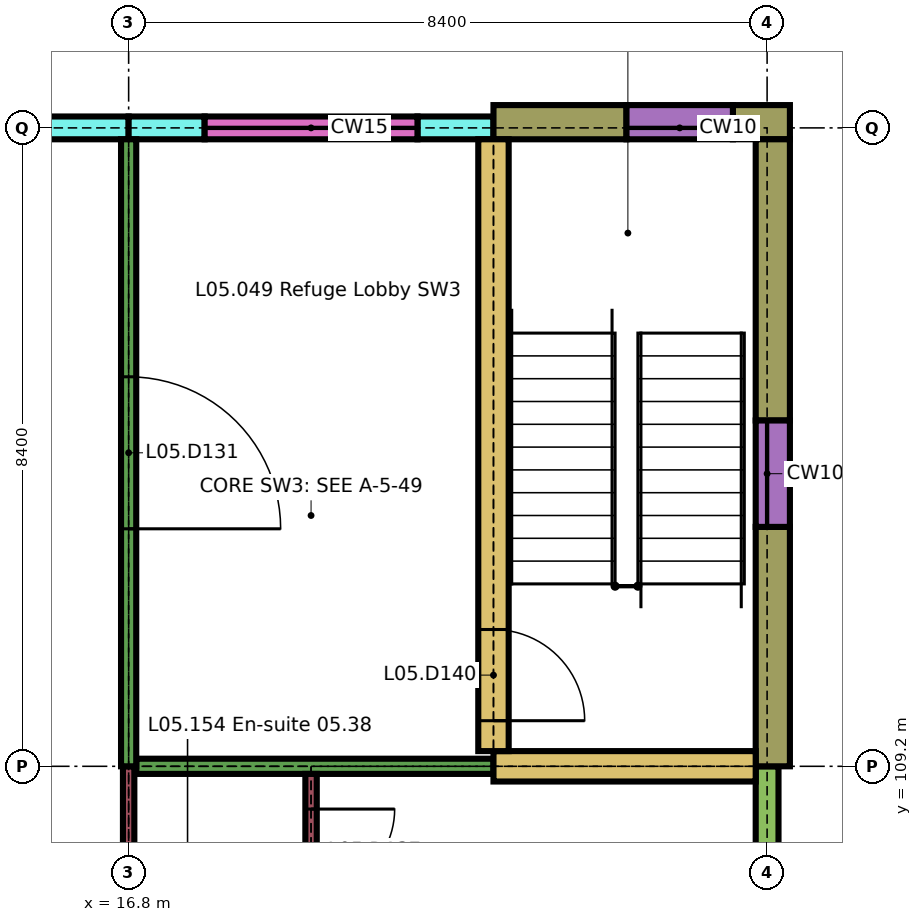
"""IFC4 building model, lengths in metres.
Left out: names, types, materials, properties, quantities, classifications, styles, units other than length and angle.
Written with IfcOpenShell. Run it as: python <this file> out.ifc"""

import sys

from ifc_helpers import new_model, si_unit, direction, frame, frame_2d, origin, place, context, subcontext, project, spatial, rectangle, extrude, element, fill, save


model = new_model("IFC4")
c1 = context("Model", 3, precision=1e-05, world=origin(), true_north=direction((0.0, 1.0)))
c2 = subcontext(c1, "Body", "Model", "MODEL_VIEW")
j1 = project(units=[si_unit("LENGTHUNIT", "METRE"), si_unit("PLANEANGLEUNIT", "RADIAN")], contexts=[c1])
p1 = place(None, origin())
s1 = spatial("IfcSite", under=j1, at=p1, CompositionType="ELEMENT")
p2 = place(p1, origin())
s2 = spatial("IfcBuilding", under=s1, at=p2, CompositionType="ELEMENT")
p3 = place(p2, frame((0.0, 0.0, 22.5)))
s3 = spatial("IfcBuildingStorey", under=s2, at=p3, CompositionType="ELEMENT", Elevation=22.5)
p4 = place(p3, frame((13.8, 117.6, 0.0), z_axis=(0.0, 0.0, 1.0), x_axis=(1.0, 0.0, 0.0)))
e1 = element("IfcWall", 1, at=p4, inside=s3, PredefinedType="SOLIDWALL", context=c2, shape_type="SweptSolid", body=[
    extrude(rectangle(XDim=3.0, YDim=0.3, at=frame_2d((1.5, 0.0))), origin(), (0.0, 0.0, 1.0), 3.26),
])
p5 = place(p4, frame((0.45, 0.0, 0.9)))
e2 = element("IfcOpeningElement", 2, at=p5, cuts=e1, PredefinedType="OPENING", context=c2, shape_type="SweptSolid", body=[
    extrude(rectangle(XDim=0.9, YDim=1.5, at=frame_2d((0.45, 0.75))), frame((0.0, 0.16, 0.0), z_axis=(0.0, -1.0, 0.0), x_axis=(1.0, 0.0, 0.0)), (0.0, 0.0, 1.0), 0.32),
])
for number, where, z_axis, x_axis in (
    (3, (16.8, 117.6, 0.0), (0.0, 0.0, 1.0), (1.0, 0.0, 0.0)),
    (4, (20.6, 117.6, 0.0), (0.0, 0.0, 1.0), (1.0, 0.0, 0.0)),
):
    element("IfcWall", number, at=place(p3, frame(where, z_axis=z_axis, x_axis=x_axis)), inside=s3, PredefinedType="SOLIDWALL", context=c2, shape_type="SweptSolid", body=[
        extrude(rectangle(XDim=1.0, YDim=0.3, at=frame_2d((0.5, 0.0))), origin(), (0.0, 0.0, 1.0), 3.26),
    ])
p6 = place(p3, frame((17.8, 117.6, 0.0), z_axis=(0.0, 0.0, 1.0), x_axis=(1.0, 0.0, 0.0)))
e5 = element("IfcWall", 5, at=p6, inside=s3, PredefinedType="SOLIDWALL", context=c2, shape_type="SweptSolid", body=[
    extrude(rectangle(XDim=2.8, YDim=0.3, at=frame_2d((1.4, 0.0))), origin(), (0.0, 0.0, 1.0), 0.6),
])
p7 = place(p3, frame((21.6, 117.675, 0.0), z_axis=(0.0, 0.0, 1.0), x_axis=(1.0, 0.0, 0.0)))
e6 = element("IfcWall", 6, at=p7, inside=s3, PredefinedType="SOLIDWALL", context=c2, shape_type="SweptSolid", body=[
    extrude(rectangle(XDim=1.75, YDim=0.45, at=frame_2d((0.875, 0.0))), origin(), (0.0, 0.0, 1.0), 3.26),
])
p8 = place(p3, frame((24.75, 117.675, 0.0), z_axis=(0.0, 0.0, 1.0), x_axis=(1.0, 0.0, 0.0)))
e7 = element("IfcWall", 7, at=p8, inside=s3, PredefinedType="SOLIDWALL", context=c2, shape_type="SweptSolid", body=[
    extrude(rectangle(XDim=0.75, YDim=0.45, at=frame_2d((0.375, 0.0))), origin(), (0.0, 0.0, 1.0), 3.26),
])
p9 = place(p3, frame((23.35, 117.675, 0.0), z_axis=(0.0, 0.0, 1.0), x_axis=(1.0, 0.0, 0.0)))
e8 = element("IfcWall", 8, at=p9, inside=s3, PredefinedType="SOLIDWALL", context=c2, shape_type="SweptSolid", body=[
    extrude(rectangle(XDim=1.4, YDim=0.45, at=frame_2d((0.7, 0.0))), origin(), (0.0, 0.0, 1.0), 0.6),
])
p10 = place(p3, frame((25.2, 105.0, 0.0), z_axis=(0.0, 0.0, 1.0), x_axis=(0.0, 1.0, 0.0)))
e9 = element("IfcWall", 9, at=p10, inside=s3, PredefinedType="SOLIDWALL", context=c2, shape_type="SweptSolid", body=[
    extrude(rectangle(XDim=4.2, YDim=0.3, at=frame_2d((2.1, 0.0))), origin(), (0.0, 0.0, 1.0), 2.96),
])
p11 = place(p10, frame((1.05, 0.0, 0.9)))
e10 = element("IfcOpeningElement", 10, at=p11, cuts=e9, PredefinedType="OPENING", context=c2, shape_type="SweptSolid", body=[
    extrude(rectangle(XDim=2.1, YDim=1.5, at=frame_2d((1.05, 0.75))), frame((0.0, 0.16, 0.0), z_axis=(0.0, -1.0, 0.0), x_axis=(1.0, 0.0, 0.0)), (0.0, 0.0, 1.0), 0.32),
])
p12 = place(p3, frame((25.275, 109.2, 0.0), z_axis=(0.0, 0.0, 1.0), x_axis=(0.0, 1.0, 0.0)))
e11 = element("IfcWall", 11, at=p12, inside=s3, PredefinedType="SOLIDWALL", context=c2, shape_type="SweptSolid", body=[
    extrude(rectangle(XDim=3.15, YDim=0.45, at=frame_2d((1.575, 0.0))), origin(), (0.0, 0.0, 1.0), 3.26),
])
p13 = place(p3, frame((25.275, 113.75, 0.0), z_axis=(0.0, 0.0, 1.0), x_axis=(0.0, 1.0, 0.0)))
e12 = element("IfcWall", 12, at=p13, inside=s3, PredefinedType="SOLIDWALL", context=c2, shape_type="SweptSolid", body=[
    extrude(rectangle(XDim=3.7, YDim=0.45, at=frame_2d((1.85, 0.0))), origin(), (0.0, 0.0, 1.0), 3.26),
])
p14 = place(p3, frame((25.275, 112.35, 0.0), z_axis=(0.0, 0.0, 1.0), x_axis=(0.0, 1.0, 0.0)))
e13 = element("IfcWall", 13, at=p14, inside=s3, PredefinedType="SOLIDWALL", context=c2, shape_type="SweptSolid", body=[
    extrude(rectangle(XDim=1.4, YDim=0.45, at=frame_2d((0.7, 0.0))), origin(), (0.0, 0.0, 1.0), 0.6),
])
p15 = place(p3, frame((16.9, 109.2, 0.0), z_axis=(0.0, 0.0, 1.0), x_axis=(1.0, 0.0, 0.0)))
e14 = element("IfcWall", 14, at=p15, inside=s3, PredefinedType="PARTITIONING", context=c2, shape_type="SweptSolid", body=[
    extrude(rectangle(XDim=4.7, YDim=0.2, at=frame_2d((2.35, 0.0))), origin(), (0.0, 0.0, 1.0), 3.26),
])
p16 = place(p3, frame((21.6, 109.2, 0.0), z_axis=(0.0, 0.0, 1.0), x_axis=(1.0, 0.0, 0.0)))
e15 = element("IfcWall", 15, at=p16, inside=s3, PredefinedType="SHEAR", context=c2, shape_type="SweptSolid", body=[
    extrude(rectangle(XDim=3.45, YDim=0.4, at=frame_2d((1.725, 0.0))), origin(), (0.0, 0.0, 1.0), 3.26),
])
p17 = place(p3, frame((16.8, 105.075, 0.0), z_axis=(0.0, 0.0, 1.0), x_axis=(0.0, 1.0, 0.0)))
e16 = element("IfcWall", 16, at=p17, inside=s3, PredefinedType="PARTITIONING", context=c2, shape_type="SweptSolid", body=[
    extrude(rectangle(XDim=4.125, YDim=0.15, at=frame_2d((2.062, 0.0))), origin(), (0.0, 0.0, 1.0), 3.26),
])
p18 = place(p17, frame((0.212, 0.0, 0.0)))
e17 = element("IfcOpeningElement", 17, at=p18, cuts=e16, PredefinedType="OPENING", context=c2, shape_type="SweptSolid", body=[
    extrude(rectangle(XDim=1.5, YDim=2.4, at=frame_2d((0.75, 1.2))), frame((0.0, 0.085, 0.0), z_axis=(0.0, -1.0, 0.0), x_axis=(1.0, 0.0, 0.0)), (0.0, 0.0, 1.0), 0.17),
])
p19 = place(p3, frame((16.8, 109.2, 0.0), z_axis=(0.0, 0.0, 1.0), x_axis=(0.0, 1.0, 0.0)))
e18 = element("IfcWall", 18, at=p19, inside=s3, PredefinedType="PARTITIONING", context=c2, shape_type="SweptSolid", body=[
    extrude(rectangle(XDim=8.25, YDim=0.2, at=frame_2d((4.125, 0.0))), origin(), (0.0, 0.0, 1.0), 3.26),
])
p20 = place(p19, frame((3.125, 0.0, 0.0)))
e19 = element("IfcOpeningElement", 19, at=p20, cuts=e18, PredefinedType="OPENING", context=c2, shape_type="SweptSolid", body=[
    extrude(rectangle(XDim=2.0, YDim=2.4, at=frame_2d((1.0, 1.2))), frame((0.0, 0.11, 0.0), z_axis=(0.0, -1.0, 0.0), x_axis=(1.0, 0.0, 0.0)), (0.0, 0.0, 1.0), 0.22),
])
p21 = place(p3, frame((19.2, 107.075, 0.0), z_axis=(0.0, 0.0, 1.0), x_axis=(0.0, 1.0, 0.0)))
e20 = element("IfcWall", 20, at=p21, inside=s3, PredefinedType="PARTITIONING", context=c2, shape_type="SweptSolid", body=[
    extrude(rectangle(XDim=2.025, YDim=0.15, at=frame_2d((1.013, 0.0))), origin(), (0.0, 0.0, 1.0), 3.26),
])
p22 = place(p21, frame((0.462, 0.0, 0.0)))
e21 = element("IfcOpeningElement", 21, at=p22, cuts=e20, PredefinedType="OPENING", context=c2, shape_type="SweptSolid", body=[
    extrude(rectangle(XDim=1.1, YDim=2.1, at=frame_2d((0.55, 1.05))), frame((0.0, 0.085, 0.0), z_axis=(0.0, -1.0, 0.0), x_axis=(1.0, 0.0, 0.0)), (0.0, 0.0, 1.0), 0.17),
])
p23 = place(p3, frame((21.6, 109.4, 0.0), z_axis=(0.0, 0.0, 1.0), x_axis=(0.0, 1.0, 0.0)))
e22 = element("IfcWall", 22, at=p23, inside=s3, PredefinedType="SHEAR", context=c2, shape_type="SweptSolid", body=[
    extrude(rectangle(XDim=8.05, YDim=0.4, at=frame_2d((4.025, 0.0))), origin(), (0.0, 0.0, 1.0), 3.26),
])
p24 = place(p23, frame((0.4, 0.0, 0.0)))
e23 = element("IfcOpeningElement", 23, at=p24, cuts=e22, PredefinedType="OPENING", context=c2, shape_type="SweptSolid", body=[
    extrude(rectangle(XDim=1.2, YDim=2.1, at=frame_2d((0.6, 1.05))), frame((0.0, 0.21, 0.0), z_axis=(0.0, -1.0, 0.0), x_axis=(1.0, 0.0, 0.0)), (0.0, 0.0, 1.0), 0.42),
])
p25 = place(p20, origin())
e24 = element("IfcDoor", 24, at=p25, inside=s3, OperationType="SINGLE_SWING_LEFT", PredefinedType="DOOR", context=c2, shape_type="SweptSolid", body=[
    extrude(rectangle(XDim=2.0, YDim=2.4, at=frame_2d((1.0, 1.2))), frame((0.0, 0.03, 0.0), z_axis=(0.0, -1.0, 0.0), x_axis=(1.0, 0.0, 0.0)), (0.0, 0.0, 1.0), 0.06),
])
fill(e19, e24)
p26 = place(p22, origin())
e25 = element("IfcDoor", 25, at=p26, inside=s3, OperationType="SINGLE_SWING_RIGHT", PredefinedType="DOOR", context=c2, shape_type="SweptSolid", body=[
    extrude(rectangle(XDim=1.1, YDim=2.1, at=frame_2d((0.55, 1.05))), frame((0.0, 0.025, 0.0), z_axis=(0.0, -1.0, 0.0), x_axis=(1.0, 0.0, 0.0)), (0.0, 0.0, 1.0), 0.05),
])
fill(e21, e25)
p27 = place(p24, origin())
e26 = element("IfcDoor", 26, at=p27, inside=s3, OperationType="SINGLE_SWING_LEFT", PredefinedType="DOOR", context=c2, shape_type="SweptSolid", body=[
    extrude(rectangle(XDim=1.2, YDim=2.1, at=frame_2d((0.6, 1.05))), frame((0.0, 0.025, 0.0), z_axis=(0.0, -1.0, 0.0), x_axis=(1.0, 0.0, 0.0)), (0.0, 0.0, 1.0), 0.05),
])
fill(e23, e26)
save(model, sys.argv[1])
